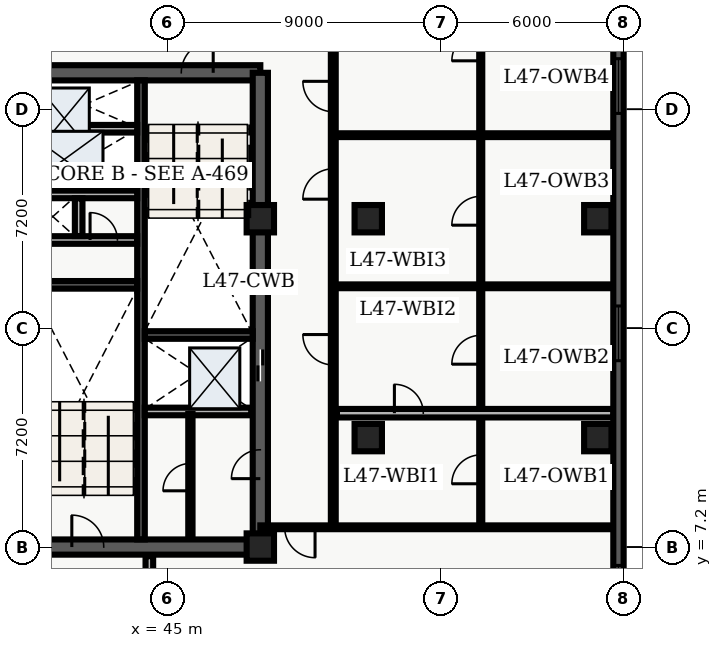
"""IFC4 building model, lengths in metres.
Left out: names, types, materials, properties, quantities, classifications, styles, units other than length and angle.
Written with IfcOpenShell. Run it as: python <this file> out.ifc"""

import sys

from ifc_helpers import new_model, entity, si_unit, converted_unit, direction, frame, origin_with_axes, origin_2d_with_axis, place, context, subcontext, project, spatial, polyline, rectangle, outline, extrude, element, fill, save


model = new_model("IFC4")
c1 = context("Model", 3, precision=1e-05, world=origin_with_axes(), true_north=direction((0.0, 1.0)))
c2 = subcontext(c1, "Body", "Model", "MODEL_VIEW")
j1 = project(units=[si_unit("LENGTHUNIT", "METRE"), converted_unit("PLANEANGLEUNIT", "DEGREE", entity("IfcPlaneAngleMeasure", 0.017), si_unit("PLANEANGLEUNIT", "RADIAN"), dimensions=[0, 0, 0, 0, 0, 0, 0])], contexts=[c1])
p1 = place(None, origin_with_axes())
s1 = spatial("IfcSite", under=j1, at=p1, CompositionType="ELEMENT")
p2 = place(p1, origin_with_axes())
s2 = spatial("IfcBuilding", under=s1, at=p2, CompositionType="ELEMENT")
p3 = place(p2, frame((0.0, 0.0, 192.6), z_axis=(0.0, 0.0, 1.0), x_axis=(1.0, 0.0, 0.0)))
s3 = spatial("IfcBuildingStorey", under=s2, at=p3, CompositionType="ELEMENT", Elevation=192.6)
p4 = place(p3, frame((40.2, 7.2, 0.0), z_axis=(0.0, 0.0, 1.0), x_axis=(1.0, 0.0, 0.0)))
e1 = element("IfcWall", 1, at=p4, inside=s3, PredefinedType="SHEAR", context=c2, shape_type="SweptSolid", body=[
    extrude(outline(polyline([(0.0, -0.25), (7.85, -0.25), (7.85, 0.25), (0.0, 0.25), (0.0, -0.25)])), origin_with_axes(), (0.0, 0.0, 1.0), 3.66),
])
p5 = place(p4, frame((2.175, 0.0, 0.0), z_axis=(0.0, 0.0, 1.0), x_axis=(1.0, 0.0, 0.0)))
e2 = element("IfcOpeningElement", 2, at=p5, cuts=e1, PredefinedType="OPENING", context=c2, shape_type="SweptSolid", body=[
    extrude(rectangle(XDim=1.05, YDim=0.52, at=origin_2d_with_axis()), origin_with_axes(), (0.0, 0.0, 1.0), 2.15),
])
p6 = place(p3, frame((40.2, 22.8, 0.0), z_axis=(0.0, 0.0, 1.0), x_axis=(1.0, 0.0, 0.0)))
e3 = element("IfcWall", 3, at=p6, inside=s3, PredefinedType="SHEAR", context=c2, shape_type="SweptSolid", body=[
    extrude(outline(polyline([(0.0, -0.25), (7.85, -0.25), (7.85, 0.25), (0.0, 0.25), (0.0, -0.25)])), origin_with_axes(), (0.0, 0.0, 1.0), 3.66),
])
p7 = place(p6, frame((5.775, 0.0, 0.0), z_axis=(0.0, 0.0, 1.0), x_axis=(1.0, 0.0, 0.0)))
e4 = element("IfcOpeningElement", 4, at=p7, cuts=e3, PredefinedType="OPENING", context=c2, shape_type="SweptSolid", body=[
    extrude(rectangle(XDim=1.05, YDim=0.52, at=origin_2d_with_axis()), origin_with_axes(), (0.0, 0.0, 1.0), 2.15),
])
p8 = place(p3, frame((48.05, 7.2, 0.0), z_axis=(0.0, 0.0, 1.0), x_axis=(0.0, 1.0, 0.0)))
e5 = element("IfcWall", 5, at=p8, inside=s3, PredefinedType="SHEAR", context=c2, shape_type="SweptSolid", body=[
    extrude(outline(polyline([(0.0, -0.25), (15.6, -0.25), (15.6, 0.25), (0.0, 0.25), (0.0, -0.25)])), origin_with_axes(), (0.0, 0.0, 1.0), 3.66),
])
p9 = place(p8, frame((5.975, 0.0, 0.0), z_axis=(0.0, 0.0, 1.0), x_axis=(1.0, 0.0, 0.0)))
e6 = element("IfcOpeningElement", 6, at=p9, cuts=e5, PredefinedType="OPENING", context=c2, shape_type="SweptSolid", body=[
    extrude(rectangle(XDim=1.05, YDim=0.52, at=origin_2d_with_axis()), origin_with_axes(), (0.0, 0.0, 1.0), 2.15),
])
p10 = place(p8, frame((2.725, 0.0, 0.0), z_axis=(0.0, 0.0, 1.0), x_axis=(1.0, 0.0, 0.0)))
e7 = element("IfcOpeningElement", 7, at=p10, cuts=e5, PredefinedType="OPENING", context=c2, shape_type="SweptSolid", body=[
    extrude(rectangle(XDim=0.95, YDim=0.52, at=origin_2d_with_axis()), origin_with_axes(), (0.0, 0.0, 1.0), 2.15),
])
p11 = place(p3, frame((44.125, 7.45, 0.0), z_axis=(0.0, 0.0, 1.0), x_axis=(0.0, 1.0, 0.0)))
e8 = element("IfcWall", 8, at=p11, inside=s3, PredefinedType="SHEAR", context=c2, shape_type="SweptSolid", body=[
    extrude(outline(polyline([(0.0, -0.125), (15.1, -0.125), (15.1, 0.125), (0.0, 0.125), (0.0, -0.125)])), origin_with_axes(), (0.0, 0.0, 1.0), 3.66),
])
for number, where, z_axis, x_axis in (
    (9, (40.45, 15.825, 0.0), (0.0, 0.0, 1.0), (1.0, 0.0, 0.0)),
    (10, (44.25, 14.175, 0.0), (0.0, 0.0, 1.0), (1.0, 0.0, 0.0)),
):
    element("IfcWall", number, at=place(p3, frame(where, z_axis=z_axis, x_axis=x_axis)), inside=s3, PredefinedType="SHEAR", context=c2, shape_type="SweptSolid", body=[
        extrude(outline(polyline([(0.0, -0.125), (3.55, -0.125), (3.55, 0.125), (0.0, 0.125), (0.0, -0.125)])), origin_with_axes(), (0.0, 0.0, 1.0), 3.66),
    ])
p12 = place(p3, frame((40.5, 17.3, 0.0), z_axis=(0.0, 0.0, 1.0), x_axis=(1.0, 0.0, 0.0)))
e11 = element("IfcWall", 11, at=p12, inside=s3, PredefinedType="SOLIDWALL", context=c2, shape_type="SweptSolid", body=[
    extrude(outline(polyline([(0.0, -0.125), (3.5, -0.125), (3.5, 0.125), (0.0, 0.125), (0.0, -0.125)])), origin_with_axes(), (0.0, 0.0, 1.0), 2.7),
])
p13 = place(p12, frame((2.4, 0.0, 0.0), z_axis=(0.0, 0.0, 1.0), x_axis=(1.0, 0.0, 0.0)))
e12 = element("IfcOpeningElement", 12, at=p13, cuts=e11, PredefinedType="OPENING", context=c2, shape_type="SweptSolid", body=[
    extrude(rectangle(XDim=0.9, YDim=0.27, at=origin_2d_with_axis()), origin_with_axes(), (0.0, 0.0, 1.0), 2.15),
])
p14 = place(p3, frame((40.5, 18.8, 0.0), z_axis=(0.0, 0.0, 1.0), x_axis=(1.0, 0.0, 0.0)))
e13 = element("IfcWall", 13, at=p14, inside=s3, PredefinedType="SOLIDWALL", context=c2, shape_type="SweptSolid", body=[
    extrude(outline(polyline([(0.0, -0.125), (3.5, -0.125), (3.5, 0.125), (0.0, 0.125), (0.0, -0.125)])), origin_with_axes(), (0.0, 0.0, 1.0), 2.7),
])
p15 = place(p3, frame((42.075, 17.43, 0.0), z_axis=(0.0, 0.0, 1.0), x_axis=(0.0, 1.0, 0.0)))
e14 = element("IfcWall", 14, at=p15, inside=s3, PredefinedType="SOLIDWALL", context=c2, shape_type="SweptSolid", body=[
    extrude(outline(polyline([(0.0, -0.125), (1.24, -0.125), (1.24, 0.125), (0.0, 0.125), (0.0, -0.125)])), origin_with_axes(), (0.0, 0.0, 1.0), 2.7),
])
p16 = place(p3, frame((44.4, 3.1, 0.0), z_axis=(0.0, 0.0, 1.0), x_axis=(0.0, 1.0, 0.0)))
e15 = element("IfcWall", 15, at=p16, inside=s3, PredefinedType="SOLIDWALL", context=c2, shape_type="SweptSolid", body=[
    extrude(outline(polyline([(0.0, -0.125), (3.8, -0.125), (3.8, 0.125), (0.0, 0.125), (0.0, -0.125)])), origin_with_axes(), (0.0, 0.0, 1.0), 2.7),
])
for number, where, z_axis, x_axis in (
    (16, (48.05, 7.2, 0.0), (0.0, 0.0, 1.0), (1.0, 0.0, 0.0)),
    (17, (48.05, 18.0, 0.0), (0.0, 0.0, 1.0), (1.0, 0.0, 0.0)),
    (18, (51.6, 10.8, 0.0), (0.0, 0.0, 1.0), (1.0, 0.0, 0.0)),
    (19, (51.6, 18.0, 0.0), (0.0, 0.0, 1.0), (1.0, 0.0, 0.0)),
    (20, (59.15, 10.8, 0.0), (0.0, 0.0, 1.0), (1.0, 0.0, 0.0)),
    (21, (59.15, 18.0, 0.0), (0.0, 0.0, 1.0), (1.0, 0.0, 0.0)),
):
    element("IfcColumn", number, at=place(p3, frame(where, z_axis=z_axis, x_axis=x_axis)), inside=s3, PredefinedType="COLUMN", context=c2, shape_type="SweptSolid", body=[
        extrude(rectangle(XDim=0.9, YDim=0.9, at=origin_2d_with_axis()), origin_with_axes(), (0.0, 0.0, 1.0), 3.9),
    ])
for number, where, z_axis, x_axis in (
    (22, (40.5, 20.96, 0.0), (0.0, 0.0, 1.0), (1.0, 0.0, 0.0)),
    (23, (44.25, 11.66, 0.0), (0.0, 0.0, 1.0), (1.0, 0.0, 0.0)),
):
    element("IfcWall", number, at=place(p3, frame(where, z_axis=z_axis, x_axis=x_axis)), inside=s3, PredefinedType="SOLIDWALL", context=c2, shape_type="SweptSolid", body=[
        extrude(outline(polyline([(0.0, -0.125), (3.5, -0.125), (3.5, 0.125), (0.0, 0.125), (0.0, -0.125)])), origin_with_axes(), (0.0, 0.0, 1.0), 2.7),
    ])
p17 = place(p3, frame((45.75, 7.5, 0.0), z_axis=(0.0, 0.0, 1.0), x_axis=(0.0, 1.0, 0.0)))
e24 = element("IfcWall", 24, at=p17, inside=s3, PredefinedType="PARTITIONING", context=c2, shape_type="SweptSolid", body=[
    extrude(outline(polyline([(0.0, -0.07), (4.08, -0.07), (4.08, 0.07), (0.0, 0.07), (0.0, -0.07)])), origin_with_axes(), (0.0, 0.0, 1.0), 2.7),
])
p18 = place(p17, frame((2.0, 0.0, 0.0), z_axis=(0.0, 0.0, 1.0), x_axis=(1.0, 0.0, 0.0)))
e25 = element("IfcOpeningElement", 25, at=p18, cuts=e24, PredefinedType="OPENING", context=c2, shape_type="SweptSolid", body=[
    extrude(rectangle(XDim=0.9, YDim=0.16, at=origin_2d_with_axis()), origin_with_axes(), (0.0, 0.0, 1.0), 2.15),
])
p19 = place(p3, frame((50.45, 7.85, 0.0), z_axis=(0.0, 0.0, 1.0), x_axis=(0.0, 1.0, 0.0)))
e26 = element("IfcWall", 26, at=p19, inside=s3, PredefinedType="PARTITIONING", context=c2, shape_type="SweptSolid", body=[
    extrude(outline(polyline([(0.0, -0.08), (18.8, -0.08), (18.8, 0.08), (0.0, 0.08), (0.0, -0.08)])), origin_with_axes(), (0.0, 0.0, 1.0), 2.7),
])
p20 = place(p19, frame((5.84, 0.0, 0.0), z_axis=(0.0, 0.0, 1.0), x_axis=(1.0, 0.0, 0.0)))
e27 = element("IfcOpeningElement", 27, at=p20, cuts=e26, PredefinedType="OPENING", context=c2, shape_type="SweptSolid", body=[
    extrude(rectangle(XDim=1.0, YDim=0.18, at=origin_2d_with_axis()), origin_with_axes(), (0.0, 0.0, 1.0), 2.15),
])
p21 = place(p19, frame((11.293, 0.0, 0.0), z_axis=(0.0, 0.0, 1.0), x_axis=(1.0, 0.0, 0.0)))
e28 = element("IfcOpeningElement", 28, at=p21, cuts=e26, PredefinedType="OPENING", context=c2, shape_type="SweptSolid", body=[
    extrude(rectangle(XDim=1.0, YDim=0.18, at=origin_2d_with_axis()), origin_with_axes(), (0.0, 0.0, 1.0), 2.15),
])
p22 = place(p19, frame((14.169, 0.0, 0.0), z_axis=(0.0, 0.0, 1.0), x_axis=(1.0, 0.0, 0.0)))
e29 = element("IfcOpeningElement", 29, at=p22, cuts=e26, PredefinedType="OPENING", context=c2, shape_type="SweptSolid", body=[
    extrude(rectangle(XDim=1.0, YDim=0.18, at=origin_2d_with_axis()), origin_with_axes(), (0.0, 0.0, 1.0), 2.15),
])
p23 = place(p3, frame((59.665, 7.85, 0.0), z_axis=(0.0, 0.0, 1.0), x_axis=(-1.0, 0.0, 0.0)))
e30 = element("IfcWall", 30, at=p23, inside=s3, PredefinedType="PARTITIONING", context=c2, shape_type="SweptSolid", body=[
    extrude(outline(polyline([(0.0, -0.062), (11.615, -0.062), (11.615, 0.062), (0.0, 0.062), (0.0, -0.062)])), origin_with_axes(), (0.0, 0.0, 1.0), 2.7),
])
p24 = place(p23, frame((10.315, 0.0, 0.0), z_axis=(0.0, 0.0, 1.0), x_axis=(1.0, 0.0, 0.0)))
e31 = element("IfcOpeningElement", 31, at=p24, cuts=e30, PredefinedType="OPENING", context=c2, shape_type="SweptSolid", body=[
    extrude(rectangle(XDim=1.0, YDim=0.145, at=origin_2d_with_axis()), origin_with_axes(), (0.0, 0.0, 1.0), 2.15),
])
p25 = place(p3, frame((55.3, 7.98, 0.0), z_axis=(0.0, 0.0, 1.0), x_axis=(0.0, 1.0, 0.0)))
e32 = element("IfcWall", 32, at=p25, inside=s3, PredefinedType="PARTITIONING", context=c2, shape_type="SweptSolid", body=[
    extrude(outline(polyline([(0.0, -0.05), (18.54, -0.05), (18.54, 0.05), (0.0, 0.05), (0.0, -0.05)])), origin_with_axes(), (0.0, 0.0, 1.0), 2.7),
])
p26 = place(p25, frame((1.776, 0.0, 0.0), z_axis=(0.0, 0.0, 1.0), x_axis=(1.0, 0.0, 0.0)))
e33 = element("IfcOpeningElement", 33, at=p26, cuts=e32, PredefinedType="OPENING", context=c2, shape_type="SweptSolid", body=[
    extrude(rectangle(XDim=0.95, YDim=0.12, at=origin_2d_with_axis()), origin_with_axes(), (0.0, 0.0, 1.0), 2.15),
])
p27 = place(p25, frame((5.71, 0.0, 0.0), z_axis=(0.0, 0.0, 1.0), x_axis=(1.0, 0.0, 0.0)))
e34 = element("IfcOpeningElement", 34, at=p27, cuts=e32, PredefinedType="OPENING", context=c2, shape_type="SweptSolid", body=[
    extrude(rectangle(XDim=0.95, YDim=0.12, at=origin_2d_with_axis()), origin_with_axes(), (0.0, 0.0, 1.0), 2.15),
])
p28 = place(p25, frame((10.283, 0.0, 0.0), z_axis=(0.0, 0.0, 1.0), x_axis=(1.0, 0.0, 0.0)))
e35 = element("IfcOpeningElement", 35, at=p28, cuts=e32, PredefinedType="OPENING", context=c2, shape_type="SweptSolid", body=[
    extrude(rectangle(XDim=0.95, YDim=0.12, at=origin_2d_with_axis()), origin_with_axes(), (0.0, 0.0, 1.0), 2.15),
])
p29 = place(p25, frame((15.689, 0.0, 0.0), z_axis=(0.0, 0.0, 1.0), x_axis=(1.0, 0.0, 0.0)))
e36 = element("IfcOpeningElement", 36, at=p29, cuts=e32, PredefinedType="OPENING", context=c2, shape_type="SweptSolid", body=[
    extrude(rectangle(XDim=0.95, YDim=0.12, at=origin_2d_with_axis()), origin_with_axes(), (0.0, 0.0, 1.0), 2.15),
])
p30 = place(p3, frame((50.57, 11.603, 0.0), z_axis=(0.0, 0.0, 1.0), x_axis=(1.0, 0.0, 0.0)))
e37 = element("IfcWall", 37, at=p30, inside=s3, PredefinedType="PARTITIONING", context=c2, shape_type="SweptSolid", body=[
    extrude(outline(polyline([(0.0, -0.14), (9.095, -0.14), (9.095, 0.14), (0.0, 0.14), (0.0, -0.14)])), origin_with_axes(), (0.0, 0.0, 1.0), 2.7),
])
p31 = place(p30, frame((2.365, 0.0, 0.0), z_axis=(0.0, 0.0, 1.0), x_axis=(1.0, 0.0, 0.0)))
e38 = element("IfcOpeningElement", 38, at=p31, cuts=e37, PredefinedType="OPENING", context=c2, shape_type="SweptSolid", body=[
    extrude(rectangle(XDim=0.95, YDim=0.3, at=origin_2d_with_axis()), origin_with_axes(), (0.0, 0.0, 1.0), 2.15),
])
for number, where, z_axis, x_axis in (
    (39, (50.57, 15.777, 0.0), (0.0, 0.0, 1.0), (1.0, 0.0, 0.0)),
    (40, (50.57, 20.748, 0.0), (0.0, 0.0, 1.0), (1.0, 0.0, 0.0)),
):
    element("IfcWall", number, at=place(p3, frame(where, z_axis=z_axis, x_axis=x_axis)), inside=s3, PredefinedType="PARTITIONING", context=c2, shape_type="SweptSolid", body=[
        extrude(outline(polyline([(0.0, -0.062), (9.095, -0.062), (9.095, 0.062), (0.0, 0.062), (0.0, -0.062)])), origin_with_axes(), (0.0, 0.0, 1.0), 2.7),
    ])
p32 = place(p3, frame((59.83, 26.06, 0.0), z_axis=(0.0, 0.0, 1.0), x_axis=(0.0, -1.0, 0.0)))
e41 = element("IfcWall", 41, at=p32, inside=s3, PredefinedType="SOLIDWALL", context=c2, shape_type="SweptSolid", body=[
    extrude(outline(polyline([(0.0, -0.17), (23.66, -0.17), (23.66, 0.17), (0.0, 0.17), (0.0, -0.17)])), origin_with_axes(), (0.0, 0.0, 1.0), 3.66),
])
p33 = place(p32, frame((3.696, 0.0, 0.45), z_axis=(0.0, 0.0, 1.0), x_axis=(1.0, 0.0, 0.0)))
e42 = element("IfcOpeningElement", 42, at=p33, cuts=e41, PredefinedType="OPENING", context=c2, shape_type="SweptSolid", body=[
    extrude(rectangle(XDim=1.8, YDim=0.36, at=origin_2d_with_axis()), origin_with_axes(), (0.0, 0.0, 1.0), 2.1),
])
p34 = place(p32, frame((11.83, 0.0, 0.45), z_axis=(0.0, 0.0, 1.0), x_axis=(1.0, 0.0, 0.0)))
e43 = element("IfcOpeningElement", 43, at=p34, cuts=e41, PredefinedType="OPENING", context=c2, shape_type="SweptSolid", body=[
    extrude(rectangle(XDim=1.8, YDim=0.36, at=origin_2d_with_axis()), origin_with_axes(), (0.0, 0.0, 1.0), 2.1),
])
p35 = place(p32, frame((20.364, 0.0, 0.45), z_axis=(0.0, 0.0, 1.0), x_axis=(1.0, 0.0, 0.0)))
e44 = element("IfcOpeningElement", 44, at=p35, cuts=e41, PredefinedType="OPENING", context=c2, shape_type="SweptSolid", body=[
    extrude(rectangle(XDim=1.8, YDim=0.36, at=origin_2d_with_axis()), origin_with_axes(), (0.0, 0.0, 1.0), 2.1),
])
p36 = place(p8, frame((5.975, 0.0, 0.0), z_axis=(0.0, 0.0, 1.0), x_axis=(1.0, 0.0, 0.0)))
e45 = element("IfcDoor", 45, at=p36, inside=s3, OperationType="SLIDING_TO_LEFT", PredefinedType="DOOR", context=c2, shape_type="SweptSolid", body=[
    extrude(rectangle(XDim=1.05, YDim=0.09, at=origin_2d_with_axis()), origin_with_axes(), (0.0, 0.0, 1.0), 2.15),
])
fill(e6, e45)
p37 = place(p12, frame((2.4, 0.0, 0.0), z_axis=(0.0, 0.0, 1.0), x_axis=(1.0, 0.0, 0.0)))
e46 = element("IfcDoor", 46, at=p37, inside=s3, OperationType="SINGLE_SWING_LEFT", PredefinedType="DOOR", context=c2, shape_type="SweptSolid", body=[
    extrude(rectangle(XDim=0.9, YDim=0.09, at=origin_2d_with_axis()), origin_with_axes(), (0.0, 0.0, 1.0), 2.15),
])
fill(e12, e46)
p38 = place(p4, frame((2.175, 0.0, 0.0), z_axis=(0.0, 0.0, 1.0), x_axis=(1.0, 0.0, 0.0)))
e47 = element("IfcDoor", 47, at=p38, inside=s3, OperationType="SINGLE_SWING_LEFT", PredefinedType="DOOR", context=c2, shape_type="SweptSolid", body=[
    extrude(rectangle(XDim=1.05, YDim=0.09, at=origin_2d_with_axis()), origin_with_axes(), (0.0, 0.0, 1.0), 2.15),
])
fill(e2, e47)
p39 = place(p6, frame((5.775, 0.0, 0.0), z_axis=(0.0, 0.0, 1.0), x_axis=(1.0, 0.0, 0.0)))
e48 = element("IfcDoor", 48, at=p39, inside=s3, OperationType="SINGLE_SWING_RIGHT", PredefinedType="DOOR", context=c2, shape_type="SweptSolid", body=[
    extrude(rectangle(XDim=1.05, YDim=0.09, at=origin_2d_with_axis()), origin_with_axes(), (0.0, 0.0, 1.0), 2.15),
])
fill(e4, e48)
p40 = place(p17, frame((2.0, 0.0, 0.0), z_axis=(0.0, 0.0, 1.0), x_axis=(1.0, 0.0, 0.0)))
e49 = element("IfcDoor", 49, at=p40, inside=s3, OperationType="SINGLE_SWING_LEFT", PredefinedType="DOOR", context=c2, shape_type="SweptSolid", body=[
    extrude(rectangle(XDim=0.9, YDim=0.084, at=origin_2d_with_axis()), origin_with_axes(), (0.0, 0.0, 1.0), 2.15),
])
fill(e25, e49)
p41 = place(p8, frame((2.725, 0.0, 0.0), z_axis=(0.0, 0.0, 1.0), x_axis=(1.0, 0.0, 0.0)))
e50 = element("IfcDoor", 50, at=p41, inside=s3, OperationType="SINGLE_SWING_LEFT", PredefinedType="DOOR", context=c2, shape_type="SweptSolid", body=[
    extrude(rectangle(XDim=0.95, YDim=0.09, at=origin_2d_with_axis()), origin_with_axes(), (0.0, 0.0, 1.0), 2.15),
])
fill(e7, e50)
p42 = place(p23, frame((10.315, 0.0, 0.0), z_axis=(0.0, 0.0, 1.0), x_axis=(1.0, 0.0, 0.0)))
e51 = element("IfcDoor", 51, at=p42, inside=s3, OperationType="SINGLE_SWING_LEFT", PredefinedType="DOOR", context=c2, shape_type="SweptSolid", body=[
    extrude(rectangle(XDim=1.0, YDim=0.075, at=origin_2d_with_axis()), origin_with_axes(), (0.0, 0.0, 1.0), 2.15),
])
fill(e31, e51)
p43 = place(p25, frame((1.776, 0.0, 0.0), z_axis=(0.0, 0.0, 1.0), x_axis=(1.0, 0.0, 0.0)))
e52 = element("IfcDoor", 52, at=p43, inside=s3, OperationType="SINGLE_SWING_LEFT", PredefinedType="DOOR", context=c2, shape_type="SweptSolid", body=[
    extrude(rectangle(XDim=0.95, YDim=0.06, at=origin_2d_with_axis()), origin_with_axes(), (0.0, 0.0, 1.0), 2.15),
])
fill(e33, e52)
p44 = place(p30, frame((2.365, 0.0, 0.0), z_axis=(0.0, 0.0, 1.0), x_axis=(1.0, 0.0, 0.0)))
e53 = element("IfcDoor", 53, at=p44, inside=s3, OperationType="SINGLE_SWING_LEFT", PredefinedType="DOOR", context=c2, shape_type="SweptSolid", body=[
    extrude(rectangle(XDim=0.95, YDim=0.09, at=origin_2d_with_axis()), origin_with_axes(), (0.0, 0.0, 1.0), 2.15),
])
fill(e38, e53)
p45 = place(p25, frame((5.71, 0.0, 0.0), z_axis=(0.0, 0.0, 1.0), x_axis=(1.0, 0.0, 0.0)))
e54 = element("IfcDoor", 54, at=p45, inside=s3, OperationType="SINGLE_SWING_LEFT", PredefinedType="DOOR", context=c2, shape_type="SweptSolid", body=[
    extrude(rectangle(XDim=0.95, YDim=0.06, at=origin_2d_with_axis()), origin_with_axes(), (0.0, 0.0, 1.0), 2.15),
])
fill(e34, e54)
p46 = place(p19, frame((5.84, 0.0, 0.0), z_axis=(0.0, 0.0, 1.0), x_axis=(1.0, 0.0, 0.0)))
e55 = element("IfcDoor", 55, at=p46, inside=s3, OperationType="SINGLE_SWING_RIGHT", PredefinedType="DOOR", context=c2, shape_type="SweptSolid", body=[
    extrude(rectangle(XDim=1.0, YDim=0.09, at=origin_2d_with_axis()), origin_with_axes(), (0.0, 0.0, 1.0), 2.15),
])
fill(e27, e55)
p47 = place(p25, frame((10.283, 0.0, 0.0), z_axis=(0.0, 0.0, 1.0), x_axis=(1.0, 0.0, 0.0)))
e56 = element("IfcDoor", 56, at=p47, inside=s3, OperationType="SINGLE_SWING_LEFT", PredefinedType="DOOR", context=c2, shape_type="SweptSolid", body=[
    extrude(rectangle(XDim=0.95, YDim=0.06, at=origin_2d_with_axis()), origin_with_axes(), (0.0, 0.0, 1.0), 2.15),
])
fill(e35, e56)
p48 = place(p19, frame((11.293, 0.0, 0.0), z_axis=(0.0, 0.0, 1.0), x_axis=(1.0, 0.0, 0.0)))
e57 = element("IfcDoor", 57, at=p48, inside=s3, OperationType="SINGLE_SWING_LEFT", PredefinedType="DOOR", context=c2, shape_type="SweptSolid", body=[
    extrude(rectangle(XDim=1.0, YDim=0.09, at=origin_2d_with_axis()), origin_with_axes(), (0.0, 0.0, 1.0), 2.15),
])
fill(e28, e57)
p49 = place(p25, frame((15.689, 0.0, 0.0), z_axis=(0.0, 0.0, 1.0), x_axis=(1.0, 0.0, 0.0)))
e58 = element("IfcDoor", 58, at=p49, inside=s3, OperationType="SINGLE_SWING_LEFT", PredefinedType="DOOR", context=c2, shape_type="SweptSolid", body=[
    extrude(rectangle(XDim=0.95, YDim=0.06, at=origin_2d_with_axis()), origin_with_axes(), (0.0, 0.0, 1.0), 2.15),
])
fill(e36, e58)
p50 = place(p19, frame((14.169, 0.0, 0.0), z_axis=(0.0, 0.0, 1.0), x_axis=(1.0, 0.0, 0.0)))
e59 = element("IfcDoor", 59, at=p50, inside=s3, OperationType="SINGLE_SWING_RIGHT", PredefinedType="DOOR", context=c2, shape_type="SweptSolid", body=[
    extrude(rectangle(XDim=1.0, YDim=0.09, at=origin_2d_with_axis()), origin_with_axes(), (0.0, 0.0, 1.0), 2.15),
])
fill(e29, e59)
p51 = place(p32, frame((3.696, 0.0, 0.45), z_axis=(0.0, 0.0, 1.0), x_axis=(1.0, 0.0, 0.0)))
e60 = element("IfcWindow", 60, at=p51, inside=s3, PredefinedType="WINDOW", context=c2, shape_type="SweptSolid", body=[
    extrude(rectangle(XDim=1.8, YDim=0.09, at=origin_2d_with_axis()), origin_with_axes(), (0.0, 0.0, 1.0), 2.1),
])
fill(e42, e60)
p52 = place(p32, frame((11.83, 0.0, 0.45), z_axis=(0.0, 0.0, 1.0), x_axis=(1.0, 0.0, 0.0)))
e61 = element("IfcWindow", 61, at=p52, inside=s3, PredefinedType="WINDOW", context=c2, shape_type="SweptSolid", body=[
    extrude(rectangle(XDim=1.8, YDim=0.09, at=origin_2d_with_axis()), origin_with_axes(), (0.0, 0.0, 1.0), 2.1),
])
fill(e43, e61)
p53 = place(p32, frame((20.364, 0.0, 0.45), z_axis=(0.0, 0.0, 1.0), x_axis=(1.0, 0.0, 0.0)))
e62 = element("IfcWindow", 62, at=p53, inside=s3, PredefinedType="WINDOW", context=c2, shape_type="SweptSolid", body=[
    extrude(rectangle(XDim=1.8, YDim=0.09, at=origin_2d_with_axis()), origin_with_axes(), (0.0, 0.0, 1.0), 2.1),
])
fill(e44, e62)
save(model, sys.argv[1])
